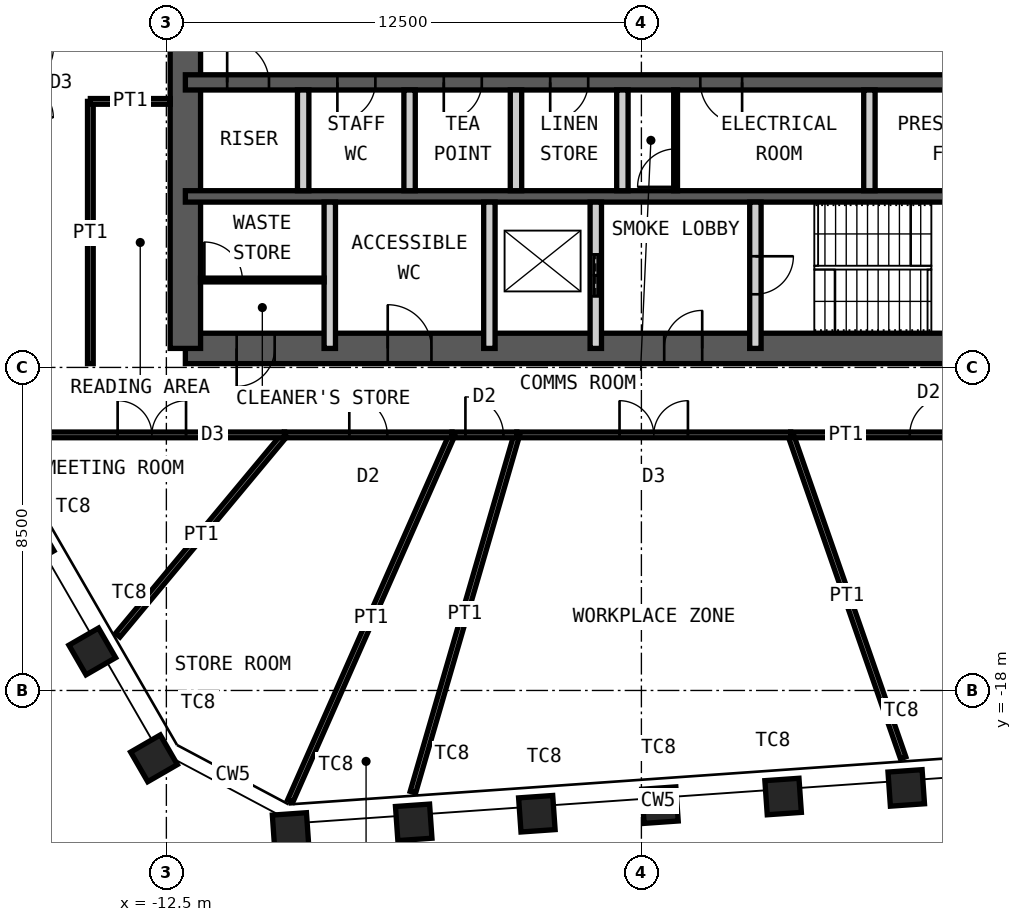
"""IFC4 building model, lengths in metres.
Left out: names, types, materials, properties, quantities, classifications, styles, units other than length and angle.
Written with IfcOpenShell. Run it as: python <this file> out.ifc"""

import sys

from ifc_helpers import new_model, si_unit, direction, frame, frame_2d, origin, origin_2d, place, context, subcontext, project, spatial, rectangle, hollow_rectangle, extrude, element, fill, save


model = new_model("IFC4")
c1 = context("Model", 3, precision=1e-05, world=origin(), true_north=direction((0.0, 1.0)))
c2 = subcontext(c1, "Body", "Model", "MODEL_VIEW")
j1 = project(units=[si_unit("LENGTHUNIT", "METRE"), si_unit("PLANEANGLEUNIT", "RADIAN")], contexts=[c1])
p1 = place(None, origin())
s1 = spatial("IfcSite", under=j1, at=p1, CompositionType="ELEMENT")
p2 = place(p1, origin())
s2 = spatial("IfcBuilding", under=s1, at=p2, CompositionType="ELEMENT")
p3 = place(p2, frame((0.0, 0.0, 308.2)))
s3 = spatial("IfcBuildingStorey", under=s2, at=p3, CompositionType="ELEMENT", Elevation=308.2)
for number, where, z_axis, x_axis in (
    (1, (6.969, -20.564, 0.0), (0.0, 0.0, 1.0), (0.998, 0.07, 0.0)),
    (2, (3.729, -20.791, 0.0), (0.0, 0.0, 1.0), (0.998, 0.07, 0.0)),
    (3, (0.489, -21.017, 0.0), (0.0, 0.0, 1.0), (0.998, 0.07, 0.0)),
    (4, (-2.751, -21.244, 0.0), (0.0, 0.0, 1.0), (0.998, 0.07, 0.0)),
    (5, (-5.991, -21.47, 0.0), (0.0, 0.0, 1.0), (0.998, 0.07, 0.0)),
    (6, (-9.231, -21.697, 0.0), (0.0, 0.0, 1.0), (0.998, 0.07, 0.0)),
    (7, (-12.825, -19.786, 0.0), (0.0, 0.0, 1.0), (0.5, -0.866, 0.0)),
    (8, (-14.449, -16.973, 0.0), (0.0, 0.0, 1.0), (0.5, -0.866, 0.0)),
    (9, (-16.073, -14.16, 0.0), (0.0, 0.0, 1.0), (0.5, -0.866, 0.0)),
):
    element("IfcColumn", number, at=place(p3, frame(where, z_axis=z_axis, x_axis=x_axis)), inside=s3, PredefinedType="COLUMN", context=c2, shape_type="SweptSolid", body=[
        extrude(hollow_rectangle(XDim=0.9, YDim=0.9, WallThickness=0.05, at=origin_2d()), origin(), (0.0, 0.0, 1.0), 4.2),
    ])
p4 = place(p3, frame((-12.0, -9.0, 0.0), z_axis=(0.0, 0.0, 1.0), x_axis=(1.0, 0.0, 0.0)))
e10 = element("IfcWall", 10, at=p4, inside=s3, PredefinedType="SHEAR", context=c2, shape_type="SweptSolid", body=[
    extrude(rectangle(XDim=24.0, YDim=0.8, at=frame_2d((12.0, 0.0))), origin(), (0.0, 0.0, 1.0), 4.2),
])
p5 = place(p4, frame((1.35, 0.0, 0.0)))
e11 = element("IfcOpeningElement", 11, at=p5, cuts=e10, PredefinedType="OPENING", context=c2, shape_type="SweptSolid", body=[
    extrude(rectangle(XDim=1.0, YDim=2.1, at=frame_2d((0.5, 1.05))), frame((0.0, 0.41, 0.0), z_axis=(0.0, -1.0, 0.0), x_axis=(1.0, 0.0, 0.0)), (0.0, 0.0, 1.0), 0.82),
])
p6 = place(p4, frame((5.325, 0.0, 0.0)))
e12 = element("IfcOpeningElement", 12, at=p6, cuts=e10, PredefinedType="OPENING", context=c2, shape_type="SweptSolid", body=[
    extrude(rectangle(XDim=1.15, YDim=2.1, at=frame_2d((0.575, 1.05))), frame((0.0, 0.41, 0.0), z_axis=(0.0, -1.0, 0.0), x_axis=(1.0, 0.0, 0.0)), (0.0, 0.0, 1.0), 0.82),
])
p7 = place(p4, frame((12.6, 0.0, 0.0)))
e13 = element("IfcOpeningElement", 13, at=p7, cuts=e10, PredefinedType="OPENING", context=c2, shape_type="SweptSolid", body=[
    extrude(rectangle(XDim=1.0, YDim=2.1, at=frame_2d((0.5, 1.05))), frame((0.0, 0.41, 0.0), z_axis=(0.0, -1.0, 0.0), x_axis=(1.0, 0.0, 0.0)), (0.0, 0.0, 1.0), 0.82),
])
p8 = place(p3, frame((-12.0, -9.0, 0.0), z_axis=(0.0, 0.0, 1.0), x_axis=(0.0, 1.0, 0.0)))
e14 = element("IfcWall", 14, at=p8, inside=s3, PredefinedType="SHEAR", context=c2, shape_type="SweptSolid", body=[
    extrude(rectangle(XDim=18.0, YDim=0.8, at=frame_2d((9.0, 0.0))), origin(), (0.0, 0.0, 1.0), 4.2),
])
p9 = place(p8, frame((8.1, 0.0, 0.0)))
e15 = element("IfcOpeningElement", 15, at=p9, cuts=e14, PredefinedType="OPENING", context=c2, shape_type="SweptSolid", body=[
    extrude(rectangle(XDim=1.8, YDim=2.1, at=frame_2d((0.9, 1.05))), frame((0.0, 0.41, 0.0), z_axis=(0.0, -1.0, 0.0), x_axis=(1.0, 0.0, 0.0)), (0.0, 0.0, 1.0), 0.82),
])
p10 = place(p3, frame((-12.0, -2.0, 0.0), z_axis=(0.0, 0.0, 1.0), x_axis=(1.0, 0.0, 0.0)))
e16 = element("IfcWall", 16, at=p10, inside=s3, PredefinedType="SHEAR", context=c2, shape_type="SweptSolid", body=[
    extrude(rectangle(XDim=24.0, YDim=0.4, at=frame_2d((12.0, 0.0))), origin(), (0.0, 0.0, 1.0), 4.2),
])
p11 = place(p10, frame((1.1, 0.0, 0.0)))
e17 = element("IfcOpeningElement", 17, at=p11, cuts=e16, PredefinedType="OPENING", context=c2, shape_type="SweptSolid", body=[
    extrude(rectangle(XDim=1.1, YDim=2.1, at=frame_2d((0.55, 1.05))), frame((0.0, 0.21, 0.0), z_axis=(0.0, -1.0, 0.0), x_axis=(1.0, 0.0, 0.0)), (0.0, 0.0, 1.0), 0.42),
])
p12 = place(p10, frame((13.55, 0.0, 0.0)))
e18 = element("IfcOpeningElement", 18, at=p12, cuts=e16, PredefinedType="OPENING", context=c2, shape_type="SweptSolid", body=[
    extrude(rectangle(XDim=1.1, YDim=2.1, at=frame_2d((0.55, 1.05))), frame((0.0, 0.21, 0.0), z_axis=(0.0, -1.0, 0.0), x_axis=(1.0, 0.0, 0.0)), (0.0, 0.0, 1.0), 0.42),
])
p13 = place(p10, frame((20.7, 0.0, 0.0)))
e19 = element("IfcOpeningElement", 19, at=p13, cuts=e16, PredefinedType="OPENING", context=c2, shape_type="SweptSolid", body=[
    extrude(rectangle(XDim=1.1, YDim=2.1, at=frame_2d((0.55, 1.05))), frame((0.0, 0.21, 0.0), z_axis=(0.0, -1.0, 0.0), x_axis=(1.0, 0.0, 0.0)), (0.0, 0.0, 1.0), 0.42),
])
p14 = place(p10, frame((4.0, 0.0, 0.0)))
e20 = element("IfcOpeningElement", 20, at=p14, cuts=e16, PredefinedType="OPENING", context=c2, shape_type="SweptSolid", body=[
    extrude(rectangle(XDim=1.0, YDim=2.1, at=frame_2d((0.5, 1.05))), frame((0.0, 0.21, 0.0), z_axis=(0.0, -1.0, 0.0), x_axis=(1.0, 0.0, 0.0)), (0.0, 0.0, 1.0), 0.42),
])
p15 = place(p10, frame((6.8, 0.0, 0.0)))
e21 = element("IfcOpeningElement", 21, at=p15, cuts=e16, PredefinedType="OPENING", context=c2, shape_type="SweptSolid", body=[
    extrude(rectangle(XDim=1.0, YDim=2.1, at=frame_2d((0.5, 1.05))), frame((0.0, 0.21, 0.0), z_axis=(0.0, -1.0, 0.0), x_axis=(1.0, 0.0, 0.0)), (0.0, 0.0, 1.0), 0.42),
])
p16 = place(p10, frame((9.6, 0.0, 0.0)))
e22 = element("IfcOpeningElement", 22, at=p16, cuts=e16, PredefinedType="OPENING", context=c2, shape_type="SweptSolid", body=[
    extrude(rectangle(XDim=1.0, YDim=2.1, at=frame_2d((0.5, 1.05))), frame((0.0, 0.21, 0.0), z_axis=(0.0, -1.0, 0.0), x_axis=(1.0, 0.0, 0.0)), (0.0, 0.0, 1.0), 0.42),
])
p17 = place(p3, frame((-12.0, -5.0, 0.0), z_axis=(0.0, 0.0, 1.0), x_axis=(1.0, 0.0, 0.0)))
e23 = element("IfcWall", 23, at=p17, inside=s3, PredefinedType="SHEAR", context=c2, shape_type="SweptSolid", body=[
    extrude(rectangle(XDim=24.0, YDim=0.3, at=frame_2d((12.0, 0.0))), origin(), (0.0, 0.0, 1.0), 4.2),
])
for number, where, z_axis, x_axis in (
    (24, (-8.9, -4.85, 0.0), (0.0, 0.0, 1.0), (0.0, 1.0, 0.0)),
    (25, (-6.1, -4.85, 0.0), (0.0, 0.0, 1.0), (0.0, 1.0, 0.0)),
    (26, (-3.3, -4.85, 0.0), (0.0, 0.0, 1.0), (0.0, 1.0, 0.0)),
    (27, (-0.5, -4.85, 0.0), (0.0, 0.0, 1.0), (0.0, 1.0, 0.0)),
    (28, (6.0, -4.85, 0.0), (0.0, 0.0, 1.0), (0.0, 1.0, 0.0)),
):
    element("IfcWall", number, at=place(p3, frame(where, z_axis=z_axis, x_axis=x_axis)), inside=s3, PredefinedType="PARTITIONING", context=c2, shape_type="SweptSolid", body=[
        extrude(rectangle(XDim=2.65, YDim=0.3, at=frame_2d((1.325, 0.0))), origin(), (0.0, 0.0, 1.0), 3.98),
    ])
for number, where, z_axis, x_axis in (
    (29, (-8.2, -9.0, 0.0), (0.0, 0.0, 1.0), (0.0, 1.0, 0.0)),
    (30, (-4.0, -9.0, 0.0), (0.0, 0.0, 1.0), (0.0, 1.0, 0.0)),
):
    element("IfcWall", number, at=place(p3, frame(where, z_axis=z_axis, x_axis=x_axis)), inside=s3, PredefinedType="PARTITIONING", context=c2, shape_type="SweptSolid", body=[
        extrude(rectangle(XDim=3.85, YDim=0.3, at=frame_2d((1.925, 0.0))), origin(), (0.0, 0.0, 1.0), 3.98),
    ])
p18 = place(p3, frame((-1.2, -9.0, 0.0), z_axis=(0.0, 0.0, 1.0), x_axis=(0.0, 1.0, 0.0)))
e31 = element("IfcWall", 31, at=p18, inside=s3, PredefinedType="PARTITIONING", context=c2, shape_type="SweptSolid", body=[
    extrude(rectangle(XDim=3.85, YDim=0.3, at=frame_2d((1.925, 0.0))), origin(), (0.0, 0.0, 1.0), 3.98),
])
p19 = place(p18, frame((1.375, 0.0, 0.0)))
e32 = element("IfcOpeningElement", 32, at=p19, cuts=e31, PredefinedType="OPENING", context=c2, shape_type="SweptSolid", body=[
    extrude(rectangle(XDim=1.1, YDim=2.4, at=frame_2d((0.55, 1.2))), frame((0.0, 0.16, 0.0), z_axis=(0.0, -1.0, 0.0), x_axis=(1.0, 0.0, 0.0)), (0.0, 0.0, 1.0), 0.32),
])
p20 = place(p3, frame((3.0, -9.0, 0.0), z_axis=(0.0, 0.0, 1.0), x_axis=(0.0, 1.0, 0.0)))
e33 = element("IfcWall", 33, at=p20, inside=s3, PredefinedType="PARTITIONING", context=c2, shape_type="SweptSolid", body=[
    extrude(rectangle(XDim=3.85, YDim=0.3, at=frame_2d((1.925, 0.0))), origin(), (0.0, 0.0, 1.0), 3.98),
])
p21 = place(p20, frame((1.425, 0.0, 0.0)))
e34 = element("IfcOpeningElement", 34, at=p21, cuts=e33, PredefinedType="OPENING", context=c2, shape_type="SweptSolid", body=[
    extrude(rectangle(XDim=1.0, YDim=2.1, at=frame_2d((0.5, 1.05))), frame((0.0, 0.16, 0.0), z_axis=(0.0, -1.0, 0.0), x_axis=(1.0, 0.0, 0.0)), (0.0, 0.0, 1.0), 0.32),
])
p22 = place(p3, frame((0.9, -4.85, 0.0), z_axis=(0.0, 0.0, 1.0), x_axis=(0.0, 1.0, 0.0)))
e35 = element("IfcWall", 35, at=p22, inside=s3, PredefinedType="PARTITIONING", context=c2, shape_type="SweptSolid", body=[
    extrude(rectangle(XDim=2.65, YDim=0.1, at=frame_2d((1.325, 0.0))), origin(), (0.0, 0.0, 1.0), 3.98),
])
p23 = place(p22, frame((0.1, 0.0, 0.0)))
e36 = element("IfcOpeningElement", 36, at=p23, cuts=e35, PredefinedType="OPENING", context=c2, shape_type="SweptSolid", body=[
    extrude(rectangle(XDim=1.0, YDim=2.4, at=frame_2d((0.5, 1.2))), frame((0.0, 0.06, 0.0), z_axis=(0.0, -1.0, 0.0), x_axis=(1.0, 0.0, 0.0)), (0.0, 0.0, 1.0), 0.12),
])
p24 = place(p3, frame((-11.6, -7.2, 0.0), z_axis=(0.0, 0.0, 1.0), x_axis=(1.0, 0.0, 0.0)))
e37 = element("IfcWall", 37, at=p24, inside=s3, PredefinedType="PARTITIONING", context=c2, shape_type="SweptSolid", body=[
    extrude(rectangle(XDim=3.25, YDim=0.1, at=frame_2d((1.625, 0.0))), origin(), (0.0, 0.0, 1.0), 3.98),
])
p25 = place(p24, frame((0.1, 0.0, 0.0)))
e38 = element("IfcOpeningElement", 38, at=p25, cuts=e37, PredefinedType="OPENING", context=c2, shape_type="SweptSolid", body=[
    extrude(rectangle(XDim=1.0, YDim=2.4, at=frame_2d((0.5, 1.2))), frame((0.0, 0.06, 0.0), z_axis=(0.0, -1.0, 0.0), x_axis=(1.0, 0.0, 0.0)), (0.0, 0.0, 1.0), 0.12),
])
p26 = place(p3, frame((11.194, -11.275, 0.0), z_axis=(0.0, 0.0, 1.0), x_axis=(-1.0, 0.0, 0.0)))
e39 = element("IfcWall", 39, at=p26, inside=s3, PredefinedType="PARTITIONING", context=c2, shape_type="SweptSolid", body=[
    extrude(rectangle(XDim=7.266, YDim=0.15, at=frame_2d((3.633, 0.0))), origin(), (0.0, 0.0, 1.0), 4.03),
])
p27 = place(p26, frame((3.133, 0.0, 0.0)))
e40 = element("IfcOpeningElement", 40, at=p27, cuts=e39, PredefinedType="OPENING", context=c2, shape_type="SweptSolid", body=[
    extrude(rectangle(XDim=1.0, YDim=2.4, at=frame_2d((0.5, 1.2))), frame((0.0, 0.085, 0.0), z_axis=(0.0, -1.0, 0.0), x_axis=(1.0, 0.0, 0.0)), (0.0, 0.0, 1.0), 0.17),
])
p28 = place(p3, frame((6.888, -19.771, 0.0), z_axis=(0.0, 0.0, 1.0), x_axis=(-0.328987878601, 0.944334144111, 0.0)))
e41 = element("IfcWall", 41, at=p28, inside=s3, PredefinedType="PARTITIONING", context=c2, shape_type="SweptSolid", body=[
    extrude(rectangle(XDim=8.997, YDim=0.15, at=frame_2d((4.499, 0.0))), origin(), (0.0, 0.0, 1.0), 3.33),
])
p29 = place(p3, frame((3.928, -11.275, 0.0), z_axis=(0.0, 0.0, 1.0), x_axis=(-1.0, 0.0, 0.0)))
e42 = element("IfcWall", 42, at=p29, inside=s3, PredefinedType="PARTITIONING", context=c2, shape_type="SweptSolid", body=[
    extrude(rectangle(XDim=7.206, YDim=0.15, at=frame_2d((3.603, 0.0))), origin(), (0.0, 0.0, 1.0), 4.03),
])
p30 = place(p29, frame((2.703, 0.0, 0.0)))
e43 = element("IfcOpeningElement", 43, at=p30, cuts=e42, PredefinedType="OPENING", context=c2, shape_type="SweptSolid", body=[
    extrude(rectangle(XDim=1.8, YDim=2.4, at=frame_2d((0.9, 1.2))), frame((0.0, 0.085, 0.0), z_axis=(0.0, -1.0, 0.0), x_axis=(1.0, 0.0, 0.0)), (0.0, 0.0, 1.0), 0.17),
])
p31 = place(p3, frame((-6.012, -20.676, 0.0), z_axis=(0.0, 0.0, 1.0), x_axis=(0.279197441451, 0.960233715658, 0.0)))
e44 = element("IfcWall", 44, at=p31, inside=s3, PredefinedType="PARTITIONING", context=c2, shape_type="SweptSolid", body=[
    extrude(rectangle(XDim=9.79, YDim=0.15, at=frame_2d((4.895, 0.0))), origin(), (0.0, 0.0, 1.0), 3.33),
])
p32 = place(p3, frame((-3.279, -11.275, 0.0), z_axis=(0.0, 0.0, 1.0), x_axis=(-1.0, 0.0, 0.0)))
e45 = element("IfcWall", 45, at=p32, inside=s3, PredefinedType="PARTITIONING", context=c2, shape_type="SweptSolid", body=[
    extrude(rectangle(XDim=1.704, YDim=0.15, at=frame_2d((0.852, 0.0))), origin(), (0.0, 0.0, 1.0), 4.03),
])
p33 = place(p32, frame((0.352, 0.0, 0.0)))
e46 = element("IfcOpeningElement", 46, at=p33, cuts=e45, PredefinedType="OPENING", context=c2, shape_type="SweptSolid", body=[
    extrude(rectangle(XDim=1.0, YDim=2.4, at=frame_2d((0.5, 1.2))), frame((0.0, 0.085, 0.0), z_axis=(0.0, -1.0, 0.0), x_axis=(1.0, 0.0, 0.0)), (0.0, 0.0, 1.0), 0.17),
])
p34 = place(p3, frame((-9.24, -20.907, 0.0), z_axis=(0.0, 0.0, 1.0), x_axis=(0.404227449851, 0.91465849845, 0.0)))
e47 = element("IfcWall", 47, at=p34, inside=s3, PredefinedType="PARTITIONING", context=c2, shape_type="SweptSolid", body=[
    extrude(rectangle(XDim=10.531, YDim=0.15, at=frame_2d((5.265, 0.0))), origin(), (0.0, 0.0, 1.0), 2.93),
])
p35 = place(p3, frame((-4.983, -11.275, 0.0), z_axis=(0.0, 0.0, 1.0), x_axis=(-1.0, 0.0, 0.0)))
e48 = element("IfcWall", 48, at=p35, inside=s3, PredefinedType="PARTITIONING", context=c2, shape_type="SweptSolid", body=[
    extrude(rectangle(XDim=4.407, YDim=0.15, at=frame_2d((2.203, 0.0))), origin(), (0.0, 0.0, 1.0), 4.03),
])
p36 = place(p35, frame((1.703, 0.0, 0.0)))
e49 = element("IfcOpeningElement", 49, at=p36, cuts=e48, PredefinedType="OPENING", context=c2, shape_type="SweptSolid", body=[
    extrude(rectangle(XDim=1.0, YDim=2.4, at=frame_2d((0.5, 1.2))), frame((0.0, 0.085, 0.0), z_axis=(0.0, -1.0, 0.0), x_axis=(1.0, 0.0, 0.0)), (0.0, 0.0, 1.0), 0.17),
])
p37 = place(p3, frame((-13.779, -16.546, 0.0), z_axis=(0.0, 0.0, 1.0), x_axis=(0.639921807512, 0.768440030367, 0.0)))
e50 = element("IfcWall", 50, at=p37, inside=s3, PredefinedType="PARTITIONING", context=c2, shape_type="SweptSolid", body=[
    extrude(rectangle(XDim=6.86, YDim=0.15, at=frame_2d((3.43, 0.0))), origin(), (0.0, 0.0, 1.0), 4.03),
])
p38 = place(p3, frame((-9.39, -11.275, 0.0), z_axis=(0.0, 0.0, 1.0), x_axis=(-1.0, 0.0, 0.0)))
e51 = element("IfcWall", 51, at=p38, inside=s3, PredefinedType="PARTITIONING", context=c2, shape_type="SweptSolid", body=[
    extrude(rectangle(XDim=6.985, YDim=0.15, at=frame_2d((3.493, 0.0))), origin(), (0.0, 0.0, 1.0), 4.03),
])
p39 = place(p38, frame((2.593, 0.0, 0.0)))
e52 = element("IfcOpeningElement", 52, at=p39, cuts=e51, PredefinedType="OPENING", context=c2, shape_type="SweptSolid", body=[
    extrude(rectangle(XDim=1.8, YDim=2.4, at=frame_2d((0.9, 1.2))), frame((0.0, 0.085, 0.0), z_axis=(0.0, -1.0, 0.0), x_axis=(1.0, 0.0, 0.0)), (0.0, 0.0, 1.0), 0.17),
])
p40 = place(p3, frame((-14.5, -9.4, 0.0), z_axis=(0.0, 0.0, 1.0), x_axis=(0.0, 1.0, 0.0)))
e53 = element("IfcWall", 53, at=p40, inside=s3, PredefinedType="PARTITIONING", context=c2, shape_type="SweptSolid", body=[
    extrude(rectangle(XDim=6.9, YDim=0.15, at=frame_2d((3.45, 0.0))), origin(), (0.0, 0.0, 1.0), 4.03),
])
p41 = place(p3, frame((-12.4, -2.5, 0.0), z_axis=(0.0, 0.0, 1.0), x_axis=(-1.0, 0.0, 0.0)))
e54 = element("IfcWall", 54, at=p41, inside=s3, PredefinedType="PARTITIONING", context=c2, shape_type="SweptSolid", body=[
    extrude(rectangle(XDim=2.1, YDim=0.15, at=frame_2d((1.05, 0.0))), origin(), (0.0, 0.0, 1.0), 3.53),
])
p42 = place(p5, origin())
e55 = element("IfcDoor", 55, at=p42, inside=s3, OperationType="SINGLE_SWING_LEFT", PredefinedType="DOOR", context=c2, shape_type="SweptSolid", body=[
    extrude(rectangle(XDim=1.0, YDim=2.1, at=frame_2d((0.5, 1.05))), frame((0.0, 0.025, 0.0), z_axis=(0.0, -1.0, 0.0), x_axis=(1.0, 0.0, 0.0)), (0.0, 0.0, 1.0), 0.05),
])
fill(e11, e55)
p43 = place(p6, origin())
e56 = element("IfcDoor", 56, at=p43, inside=s3, OperationType="SINGLE_SWING_RIGHT", PredefinedType="DOOR", context=c2, shape_type="SweptSolid", body=[
    extrude(rectangle(XDim=1.15, YDim=2.1, at=frame_2d((0.575, 1.05))), frame((0.0, 0.025, 0.0), z_axis=(0.0, -1.0, 0.0), x_axis=(1.0, 0.0, 0.0)), (0.0, 0.0, 1.0), 0.05),
])
fill(e12, e56)
p44 = place(p7, origin())
e57 = element("IfcDoor", 57, at=p44, inside=s3, OperationType="SINGLE_SWING_LEFT", PredefinedType="DOOR", context=c2, shape_type="SweptSolid", body=[
    extrude(rectangle(XDim=1.0, YDim=2.1, at=frame_2d((0.5, 1.05))), frame((0.0, 0.025, 0.0), z_axis=(0.0, -1.0, 0.0), x_axis=(1.0, 0.0, 0.0)), (0.0, 0.0, 1.0), 0.05),
])
fill(e13, e57)
p45 = place(p21, origin())
e58 = element("IfcDoor", 58, at=p45, inside=s3, OperationType="SINGLE_SWING_RIGHT", PredefinedType="DOOR", context=c2, shape_type="SweptSolid", body=[
    extrude(rectangle(XDim=1.0, YDim=2.1, at=frame_2d((0.5, 1.05))), frame((0.0, 0.025, 0.0), z_axis=(0.0, -1.0, 0.0), x_axis=(1.0, 0.0, 0.0)), (0.0, 0.0, 1.0), 0.05),
])
fill(e34, e58)
p46 = place(p11, origin())
e59 = element("IfcDoor", 59, at=p46, inside=s3, OperationType="SINGLE_SWING_RIGHT", PredefinedType="DOOR", context=c2, shape_type="SweptSolid", body=[
    extrude(rectangle(XDim=1.1, YDim=2.1, at=frame_2d((0.55, 1.05))), frame((0.0, 0.025, 0.0), z_axis=(0.0, -1.0, 0.0), x_axis=(1.0, 0.0, 0.0)), (0.0, 0.0, 1.0), 0.05),
])
fill(e17, e59)
p47 = place(p12, origin())
e60 = element("IfcDoor", 60, at=p47, inside=s3, OperationType="SINGLE_SWING_RIGHT", PredefinedType="DOOR", context=c2, shape_type="SweptSolid", body=[
    extrude(rectangle(XDim=1.1, YDim=2.1, at=frame_2d((0.55, 1.05))), frame((0.0, 0.025, 0.0), z_axis=(0.0, -1.0, 0.0), x_axis=(1.0, 0.0, 0.0)), (0.0, 0.0, 1.0), 0.05),
])
fill(e18, e60)
p48 = place(p19, origin())
e61 = element("IfcDoor", 61, at=p48, inside=s3, OperationType="DOUBLE_DOOR_SLIDING", PredefinedType="DOOR", context=c2, shape_type="SweptSolid", body=[
    extrude(rectangle(XDim=1.1, YDim=2.4, at=frame_2d((0.55, 1.2))), frame((0.0, 0.025, 0.0), z_axis=(0.0, -1.0, 0.0), x_axis=(1.0, 0.0, 0.0)), (0.0, 0.0, 1.0), 0.05),
])
fill(e32, e61)
p49 = place(p14, origin())
e62 = element("IfcDoor", 62, at=p49, inside=s3, OperationType="SINGLE_SWING_LEFT", PredefinedType="DOOR", context=c2, shape_type="SweptSolid", body=[
    extrude(rectangle(XDim=1.0, YDim=2.1, at=frame_2d((0.5, 1.05))), frame((0.0, 0.025, 0.0), z_axis=(0.0, -1.0, 0.0), x_axis=(1.0, 0.0, 0.0)), (0.0, 0.0, 1.0), 0.05),
])
fill(e20, e62)
p50 = place(p15, origin())
e63 = element("IfcDoor", 63, at=p50, inside=s3, OperationType="SINGLE_SWING_LEFT", PredefinedType="DOOR", context=c2, shape_type="SweptSolid", body=[
    extrude(rectangle(XDim=1.0, YDim=2.1, at=frame_2d((0.5, 1.05))), frame((0.0, 0.025, 0.0), z_axis=(0.0, -1.0, 0.0), x_axis=(1.0, 0.0, 0.0)), (0.0, 0.0, 1.0), 0.05),
])
fill(e21, e63)
p51 = place(p16, origin())
e64 = element("IfcDoor", 64, at=p51, inside=s3, OperationType="SINGLE_SWING_LEFT", PredefinedType="DOOR", context=c2, shape_type="SweptSolid", body=[
    extrude(rectangle(XDim=1.0, YDim=2.1, at=frame_2d((0.5, 1.05))), frame((0.0, 0.025, 0.0), z_axis=(0.0, -1.0, 0.0), x_axis=(1.0, 0.0, 0.0)), (0.0, 0.0, 1.0), 0.05),
])
fill(e22, e64)
p52 = place(p23, origin())
e65 = element("IfcDoor", 65, at=p52, inside=s3, OperationType="SINGLE_SWING_RIGHT", PredefinedType="DOOR", context=c2, shape_type="SweptSolid", body=[
    extrude(rectangle(XDim=1.0, YDim=2.4, at=frame_2d((0.5, 1.2))), frame((0.0, 0.025, 0.0), z_axis=(0.0, -1.0, 0.0), x_axis=(1.0, 0.0, 0.0)), (0.0, 0.0, 1.0), 0.05),
])
fill(e36, e65)
p53 = place(p25, origin())
e66 = element("IfcDoor", 66, at=p53, inside=s3, OperationType="SINGLE_SWING_RIGHT", PredefinedType="DOOR", context=c2, shape_type="SweptSolid", body=[
    extrude(rectangle(XDim=1.0, YDim=2.4, at=frame_2d((0.5, 1.2))), frame((0.0, 0.025, 0.0), z_axis=(0.0, -1.0, 0.0), x_axis=(1.0, 0.0, 0.0)), (0.0, 0.0, 1.0), 0.05),
])
fill(e38, e66)
p54 = place(p27, origin())
e67 = element("IfcDoor", 67, at=p54, inside=s3, OperationType="SINGLE_SWING_LEFT", PredefinedType="DOOR", context=c2, shape_type="SweptSolid", body=[
    extrude(rectangle(XDim=1.0, YDim=2.4, at=frame_2d((0.5, 1.2))), frame((0.0, 0.025, 0.0), z_axis=(0.0, -1.0, 0.0), x_axis=(1.0, 0.0, 0.0)), (0.0, 0.0, 1.0), 0.05),
])
fill(e40, e67)
p55 = place(p30, origin())
e68 = element("IfcDoor", 68, at=p55, inside=s3, OperationType="DOUBLE_DOOR_DOUBLE_SWING", PredefinedType="DOOR", context=c2, shape_type="SweptSolid", body=[
    extrude(rectangle(XDim=1.8, YDim=2.4, at=frame_2d((0.9, 1.2))), frame((0.0, 0.025, 0.0), z_axis=(0.0, -1.0, 0.0), x_axis=(1.0, 0.0, 0.0)), (0.0, 0.0, 1.0), 0.05),
])
fill(e43, e68)
p56 = place(p33, origin())
e69 = element("IfcDoor", 69, at=p56, inside=s3, OperationType="SINGLE_SWING_RIGHT", PredefinedType="DOOR", context=c2, shape_type="SweptSolid", body=[
    extrude(rectangle(XDim=1.0, YDim=2.4, at=frame_2d((0.5, 1.2))), frame((0.0, 0.025, 0.0), z_axis=(0.0, -1.0, 0.0), x_axis=(1.0, 0.0, 0.0)), (0.0, 0.0, 1.0), 0.05),
])
fill(e46, e69)
p57 = place(p36, origin())
e70 = element("IfcDoor", 70, at=p57, inside=s3, OperationType="SINGLE_SWING_RIGHT", PredefinedType="DOOR", context=c2, shape_type="SweptSolid", body=[
    extrude(rectangle(XDim=1.0, YDim=2.4, at=frame_2d((0.5, 1.2))), frame((0.0, 0.025, 0.0), z_axis=(0.0, -1.0, 0.0), x_axis=(1.0, 0.0, 0.0)), (0.0, 0.0, 1.0), 0.05),
])
fill(e49, e70)
p58 = place(p39, origin())
e71 = element("IfcDoor", 71, at=p58, inside=s3, OperationType="DOUBLE_DOOR_DOUBLE_SWING", PredefinedType="DOOR", context=c2, shape_type="SweptSolid", body=[
    extrude(rectangle(XDim=1.8, YDim=2.4, at=frame_2d((0.9, 1.2))), frame((0.0, 0.025, 0.0), z_axis=(0.0, -1.0, 0.0), x_axis=(1.0, 0.0, 0.0)), (0.0, 0.0, 1.0), 0.05),
])
fill(e52, e71)
save(model, sys.argv[1])
